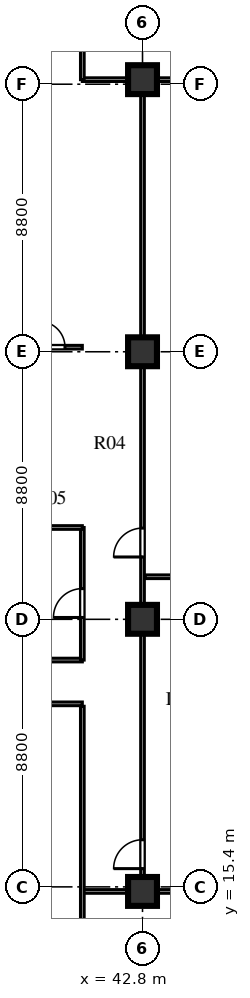
"""IFC4 building model, lengths in metres.
Left out: names, types, materials, properties, quantities, classifications, styles, units other than length and angle.
Written with IfcOpenShell. Run it as: python <this file> out.ifc"""

import sys

from ifc_helpers import new_model, si_unit, direction, frame, frame_2d, origin, origin_2d, place, context, subcontext, project, spatial, rectangle, extrude, element, fill, save


model = new_model("IFC4")
c1 = context("Model", 3, precision=1e-05, world=origin(), true_north=direction((0.0, 1.0)))
c2 = subcontext(c1, "Body", "Model", "MODEL_VIEW")
j1 = project(units=[si_unit("LENGTHUNIT", "METRE"), si_unit("PLANEANGLEUNIT", "RADIAN")], contexts=[c1])
p1 = place(None, origin())
s1 = spatial("IfcSite", under=j1, at=p1, CompositionType="ELEMENT")
p2 = place(p1, origin())
s2 = spatial("IfcBuilding", under=s1, at=p2, CompositionType="ELEMENT")
p3 = place(p2, frame((0.0, 0.0, 173.3)))
s3 = spatial("IfcBuildingStorey", under=s2, at=p3, CompositionType="ELEMENT", Elevation=173.3)
for number, where, z_axis, x_axis in (
    (1, (42.8, 15.25, 0.0), (0.0, 0.0, 1.0), (1.0, 0.0, 0.0)),
    (2, (42.8, 24.2, 0.0), (0.0, 0.0, 1.0), (1.0, 0.0, 0.0)),
    (3, (42.8, 33.0, 0.0), (0.0, 0.0, 1.0), (1.0, 0.0, 0.0)),
    (4, (42.8, 41.95, 0.0), (0.0, 0.0, 1.0), (1.0, 0.0, 0.0)),
):
    element("IfcColumn", number, at=place(p3, frame(where, z_axis=z_axis, x_axis=x_axis)), inside=s3, PredefinedType="COLUMN", context=c2, shape_type="SweptSolid", body=[
        extrude(rectangle(XDim=0.95, YDim=0.95, at=origin_2d()), origin(), (0.0, 0.0, 1.0), 3.6),
    ])
p4 = place(p3, frame((25.22, 21.42, 0.0), z_axis=(0.0, 0.0, 1.0), x_axis=(1.0, 0.0, 0.0)))
e5 = element("IfcWall", 5, at=p4, inside=s3, PredefinedType="PARTITIONING", context=c2, shape_type="SweptSolid", body=[
    extrude(rectangle(XDim=15.6, YDim=0.12, at=frame_2d((7.8, 0.0))), origin(), (0.0, 0.0, 1.0), 3.25),
])
p5 = place(p4, frame((0.73, 0.0, 0.0)))
e6 = element("IfcOpeningElement", 6, at=p5, cuts=e5, PredefinedType="OPENING", context=c2, shape_type="SweptSolid", body=[
    extrude(rectangle(XDim=0.95, YDim=2.1, at=frame_2d((0.475, 1.05))), frame((0.0, 0.07, 0.0), z_axis=(0.0, -1.0, 0.0), x_axis=(1.0, 0.0, 0.0)), (0.0, 0.0, 1.0), 0.14),
])
p6 = place(p4, frame((4.83, 0.0, 0.0)))
e7 = element("IfcOpeningElement", 7, at=p6, cuts=e5, PredefinedType="OPENING", context=c2, shape_type="SweptSolid", body=[
    extrude(rectangle(XDim=0.95, YDim=2.1, at=frame_2d((0.475, 1.05))), frame((0.0, 0.07, 0.0), z_axis=(0.0, -1.0, 0.0), x_axis=(1.0, 0.0, 0.0)), (0.0, 0.0, 1.0), 0.14),
])
p7 = place(p4, frame((10.23, 0.0, 0.0)))
e8 = element("IfcOpeningElement", 8, at=p7, cuts=e5, PredefinedType="OPENING", context=c2, shape_type="SweptSolid", body=[
    extrude(rectangle(XDim=0.95, YDim=2.1, at=frame_2d((0.475, 1.05))), frame((0.0, 0.07, 0.0), z_axis=(0.0, -1.0, 0.0), x_axis=(1.0, 0.0, 0.0)), (0.0, 0.0, 1.0), 0.14),
])
p8 = place(p3, frame((27.15, 22.86, 0.0), z_axis=(0.0, 0.0, 1.0), x_axis=(1.0, 0.0, 0.0)))
e9 = element("IfcWall", 9, at=p8, inside=s3, PredefinedType="PARTITIONING", context=c2, shape_type="SweptSolid", body=[
    extrude(rectangle(XDim=13.67, YDim=0.12, at=frame_2d((6.835, 0.0))), origin(), (0.0, 0.0, 1.0), 3.6),
])
p9 = place(p8, frame((2.2, 0.0, 0.0)))
e10 = element("IfcOpeningElement", 10, at=p9, cuts=e9, PredefinedType="OPENING", context=c2, shape_type="SweptSolid", body=[
    extrude(rectangle(XDim=0.9, YDim=2.08, at=frame_2d((0.45, 1.04))), frame((0.0, 0.07, 0.0), z_axis=(0.0, -1.0, 0.0), x_axis=(1.0, 0.0, 0.0)), (0.0, 0.0, 1.0), 0.14),
])
p10 = place(p3, frame((42.8, 15.25, 0.0), z_axis=(0.0, 0.0, 1.0), x_axis=(0.0, 1.0, 0.0)))
e11 = element("IfcWall", 11, at=p10, inside=s3, PredefinedType="PARTITIONING", context=c2, shape_type="SweptSolid", body=[
    extrude(rectangle(XDim=26.7, YDim=0.12, at=frame_2d((13.35, 0.0))), origin(), (0.0, 0.0, 1.0), 2.95),
])
p11 = place(p10, frame((0.75, 0.0, 0.0)))
e12 = element("IfcOpeningElement", 12, at=p11, cuts=e11, PredefinedType="OPENING", context=c2, shape_type="SweptSolid", body=[
    extrude(rectangle(XDim=0.95, YDim=2.1, at=frame_2d((0.475, 1.05))), frame((0.0, 0.07, 0.0), z_axis=(0.0, -1.0, 0.0), x_axis=(1.0, 0.0, 0.0)), (0.0, 0.0, 1.0), 0.14),
])
p12 = place(p10, frame((11.0, 0.0, 0.0)))
e13 = element("IfcOpeningElement", 13, at=p12, cuts=e11, PredefinedType="OPENING", context=c2, shape_type="SweptSolid", body=[
    extrude(rectangle(XDim=0.95, YDim=2.1, at=frame_2d((0.475, 1.05))), frame((0.0, 0.07, 0.0), z_axis=(0.0, -1.0, 0.0), x_axis=(1.0, 0.0, 0.0)), (0.0, 0.0, 1.0), 0.14),
])
for number, where, z_axis, x_axis in (
    (14, (40.82, 15.25, 0.0), (0.0, 0.0, 1.0), (1.0, 0.0, 0.0)),
    (15, (40.82, 41.95, 0.0), (0.0, 0.0, 1.0), (1.0, 0.0, 0.0)),
):
    element("IfcWall", number, at=place(p3, frame(where, z_axis=z_axis, x_axis=x_axis)), inside=s3, PredefinedType="PARTITIONING", context=c2, shape_type="SweptSolid", body=[
        extrude(rectangle(XDim=9.7, YDim=0.12, at=frame_2d((4.85, 0.0))), origin(), (0.0, 0.0, 1.0), 2.95),
    ])
p13 = place(p3, frame((40.82, 22.86, 0.0), z_axis=(0.0, 0.0, 1.0), x_axis=(0.0, 1.0, 0.0)))
e16 = element("IfcWall", 16, at=p13, inside=s3, PredefinedType="PARTITIONING", context=c2, shape_type="SweptSolid", body=[
    extrude(rectangle(XDim=4.36, YDim=0.12, at=frame_2d((2.18, 0.0))), origin(), (0.0, 0.0, 1.0), 3.6),
])
p14 = place(p13, frame((1.4, 0.0, 0.0)))
e17 = element("IfcOpeningElement", 17, at=p14, cuts=e16, PredefinedType="OPENING", context=c2, shape_type="SweptSolid", body=[
    extrude(rectangle(XDim=0.95, YDim=2.1, at=frame_2d((0.475, 1.05))), frame((0.0, 0.07, 0.0), z_axis=(0.0, -1.0, 0.0), x_axis=(1.0, 0.0, 0.0)), (0.0, 0.0, 1.0), 0.14),
])
p15 = place(p3, frame((36.9, 27.22, 0.0), z_axis=(0.0, 0.0, 1.0), x_axis=(1.0, 0.0, 0.0)))
e18 = element("IfcWall", 18, at=p15, inside=s3, PredefinedType="PARTITIONING", context=c2, shape_type="SweptSolid", body=[
    extrude(rectangle(XDim=3.92, YDim=0.12, at=frame_2d((1.96, 0.0))), origin(), (0.0, 0.0, 1.0), 3.25),
])
p16 = place(p3, frame((40.82, 7.88, 0.0), z_axis=(0.0, 0.0, 1.0), x_axis=(0.0, 1.0, 0.0)))
e19 = element("IfcWall", 19, at=p16, inside=s3, PredefinedType="PARTITIONING", context=c2, shape_type="SweptSolid", body=[
    extrude(rectangle(XDim=13.46, YDim=0.12, at=frame_2d((6.73, 0.0))), origin(), (0.0, 0.0, 1.0), 3.6),
])
p17 = place(p3, frame((42.88, 25.6, 0.0), z_axis=(0.0, 0.0, 1.0), x_axis=(1.0, 0.0, 0.0)))
e20 = element("IfcWall", 20, at=p17, inside=s3, PredefinedType="PARTITIONING", context=c2, shape_type="SweptSolid", body=[
    extrude(rectangle(XDim=7.64, YDim=0.12, at=frame_2d((3.82, 0.0))), origin(), (0.0, 0.0, 1.0), 3.6),
])
p18 = place(p3, frame((38.95, 33.15, 0.0), z_axis=(0.0, 0.0, 1.0), x_axis=(1.0, 0.0, 0.0)))
e21 = element("IfcWall", 21, at=p18, inside=s3, PredefinedType="PARTITIONING", context=c2, shape_type="SweptSolid", body=[
    extrude(rectangle(XDim=1.87, YDim=0.12, at=frame_2d((0.935, 0.0))), origin(), (0.0, 0.0, 1.0), 3.6),
])
p19 = place(p18, frame((0.45, 0.0, 0.0)))
e22 = element("IfcOpeningElement", 22, at=p19, cuts=e21, PredefinedType="OPENING", context=c2, shape_type="SweptSolid", body=[
    extrude(rectangle(XDim=0.85, YDim=2.05, at=frame_2d((0.425, 1.025))), frame((0.0, 0.07, 0.0), z_axis=(0.0, -1.0, 0.0), x_axis=(1.0, 0.0, 0.0)), (0.0, 0.0, 1.0), 0.14),
])
p20 = place(p3, frame((40.82, 41.95, 0.0), z_axis=(0.0, 0.0, 1.0), x_axis=(0.0, 1.0, 0.0)))
e23 = element("IfcWall", 23, at=p20, inside=s3, PredefinedType="PARTITIONING", context=c2, shape_type="SweptSolid", body=[
    extrude(rectangle(XDim=7.37, YDim=0.12, at=frame_2d((3.685, 0.0))), origin(), (0.0, 0.0, 1.0), 3.6),
])
p21 = place(p14, frame((0.95, 0.0, 0.0), z_axis=(0.0, 0.0, 1.0), x_axis=(-1.0, 0.0, 0.0)))
e24 = element("IfcDoor", 24, at=p21, inside=s3, OperationType="SINGLE_SWING_RIGHT", PredefinedType="DOOR", context=c2, shape_type="SweptSolid", body=[
    extrude(rectangle(XDim=0.95, YDim=2.1, at=frame_2d((0.475, 1.05))), frame((0.0, 0.025, 0.0), z_axis=(0.0, -1.0, 0.0), x_axis=(1.0, 0.0, 0.0)), (0.0, 0.0, 1.0), 0.05),
])
fill(e17, e24)
p22 = place(p11, origin())
e25 = element("IfcDoor", 25, at=p22, inside=s3, OperationType="SINGLE_SWING_LEFT", PredefinedType="DOOR", context=c2, shape_type="SweptSolid", body=[
    extrude(rectangle(XDim=0.95, YDim=2.1, at=frame_2d((0.475, 1.05))), frame((0.0, 0.025, 0.0), z_axis=(0.0, -1.0, 0.0), x_axis=(1.0, 0.0, 0.0)), (0.0, 0.0, 1.0), 0.05),
])
fill(e12, e25)
p23 = place(p12, origin())
e26 = element("IfcDoor", 26, at=p23, inside=s3, OperationType="SINGLE_SWING_LEFT", PredefinedType="DOOR", context=c2, shape_type="SweptSolid", body=[
    extrude(rectangle(XDim=0.95, YDim=2.1, at=frame_2d((0.475, 1.05))), frame((0.0, 0.025, 0.0), z_axis=(0.0, -1.0, 0.0), x_axis=(1.0, 0.0, 0.0)), (0.0, 0.0, 1.0), 0.05),
])
fill(e13, e26)
p24 = place(p19, origin())
e27 = element("IfcDoor", 27, at=p24, inside=s3, OperationType="SINGLE_SWING_LEFT", PredefinedType="DOOR", context=c2, shape_type="SweptSolid", body=[
    extrude(rectangle(XDim=0.85, YDim=2.05, at=frame_2d((0.425, 1.025))), frame((0.0, 0.025, 0.0), z_axis=(0.0, -1.0, 0.0), x_axis=(1.0, 0.0, 0.0)), (0.0, 0.0, 1.0), 0.05),
])
fill(e22, e27)
save(model, sys.argv[1])
